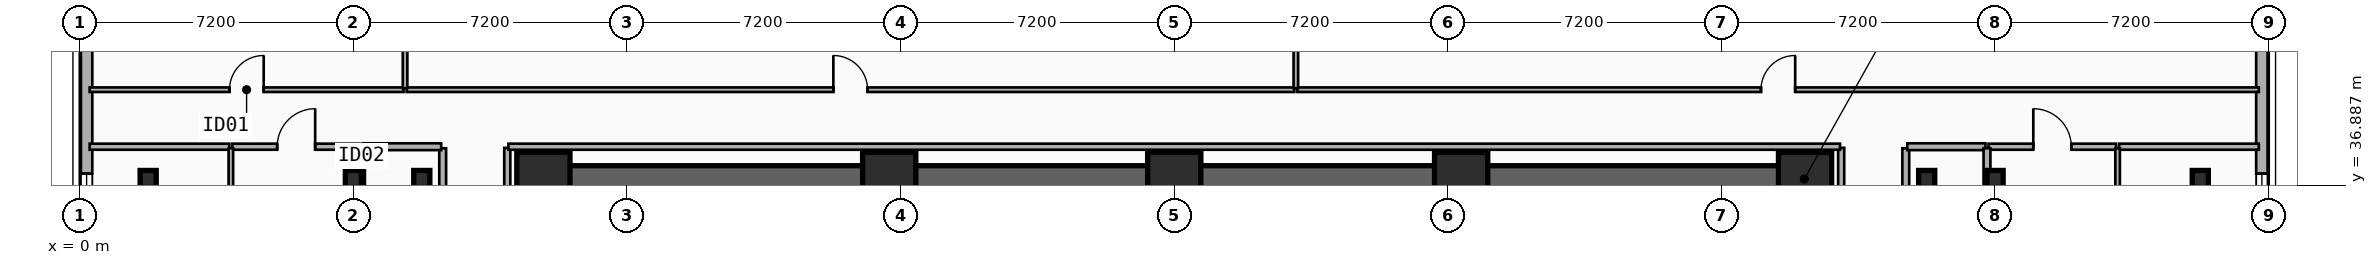
"""IFC4 building model, lengths in metres.
Left out: names, types, materials, properties, quantities, classifications, styles, units other than length and angle.
Written with IfcOpenShell. Run it as: python <this file> out.ifc"""

import sys

from ifc_helpers import new_model, si_unit, direction, frame, frame_2d, origin, origin_2d, place, context, subcontext, project, spatial, rectangle, i_section, extrude, element, fill, save


model = new_model("IFC4")
c1 = context("Model", 3, precision=1e-05, world=origin(), true_north=direction((0.0, 1.0)))
c2 = subcontext(c1, "Body", "Model", "MODEL_VIEW")
j1 = project(units=[si_unit("LENGTHUNIT", "METRE"), si_unit("PLANEANGLEUNIT", "RADIAN")], contexts=[c1])
p1 = place(None, origin())
s1 = spatial("IfcSite", under=j1, at=p1, CompositionType="ELEMENT")
p2 = place(p1, origin())
s2 = spatial("IfcBuilding", under=s1, at=p2, CompositionType="ELEMENT")
p3 = place(p2, frame((0.0, 0.0, 64.0)))
s3 = spatial("IfcBuildingStorey", under=s2, at=p3, CompositionType="ELEMENT", Elevation=64.0)
p4 = place(p3, frame((12.15, 37.05, 0.0), z_axis=(0.0, 0.0, 1.0), x_axis=(1.0, 0.0, 0.0)))
e1 = element("IfcWall", 1, at=p4, inside=s3, PredefinedType="SHEAR", context=c2, shape_type="SweptSolid", body=[
    extrude(rectangle(XDim=33.23, YDim=0.7, at=frame_2d((16.615, 0.0))), origin(), (0.0, 0.0, 1.0), 3.5),
])
for number, where, z_axis, x_axis in (
    (2, (12.2, 37.05, 0.0), (0.0, 0.0, 1.0), (1.0, 0.0, 0.0)),
    (3, (21.3, 37.05, 0.0), (0.0, 0.0, 1.0), (1.0, 0.0, 0.0)),
    (4, (28.8, 37.05, 0.0), (0.0, 0.0, 1.0), (1.0, 0.0, 0.0)),
    (5, (36.35, 37.05, 0.0), (0.0, 0.0, 1.0), (1.0, 0.0, 0.0)),
    (6, (45.4, 37.05, 0.0), (0.0, 0.0, 1.0), (1.0, 0.0, 0.0)),
):
    element("IfcColumn", number, at=place(p3, frame(where, z_axis=z_axis, x_axis=x_axis)), inside=s3, PredefinedType="COLUMN", context=c2, shape_type="SweptSolid", body=[
        extrude(rectangle(XDim=1.4, YDim=1.4, at=origin_2d()), origin(), (0.0, 0.0, 1.0), 3.5),
    ])
for number, where, z_axis, x_axis in (
    (7, (9.0, 37.05, 0.0), (0.0, 0.0, 1.0), (1.0, 0.0, 0.0)),
    (8, (48.6, 37.05, 0.0), (0.0, 0.0, 1.0), (1.0, 0.0, 0.0)),
    (9, (1.8, 37.05, 0.0), (0.0, 0.0, 1.0), (1.0, 0.0, 0.0)),
    (10, (7.2, 37.05, 0.0), (0.0, 0.0, 1.0), (1.0, 0.0, 0.0)),
    (11, (50.4, 37.05, 0.0), (0.0, 0.0, 1.0), (1.0, 0.0, 0.0)),
    (12, (55.8, 37.05, 0.0), (0.0, 0.0, 1.0), (1.0, 0.0, 0.0)),
):
    element("IfcColumn", number, at=place(p3, frame(where, z_axis=z_axis, x_axis=x_axis)), inside=s3, PredefinedType="COLUMN", context=c2, shape_type="SweptSolid", body=[
        extrude(i_section(OverallWidth=0.424, OverallDepth=0.45, WebThickness=0.041, FlangeThickness=0.065, FilletRadius=0.015, at=origin_2d()), origin(), (0.0, 0.0, 1.0), 3.5),
    ])
p5 = place(p3, frame((57.42, 41.0, 0.0), z_axis=(0.0, 0.0, 1.0), x_axis=(0.0, -1.0, 0.0)))
e13 = element("IfcWall", 13, at=p5, inside=s3, PredefinedType="SOLIDWALL", context=c2, shape_type="SweptSolid", body=[
    extrude(rectangle(XDim=15.2, YDim=0.3, at=frame_2d((7.6, 0.0))), origin(), (0.0, 0.0, 1.0), 3.24),
])
p6 = place(p5, frame((8.781, 0.0, 0.48)))
e14 = element("IfcOpeningElement", 14, at=p6, cuts=e13, PredefinedType="OPENING", context=c2, shape_type="SweptSolid", body=[
    extrude(rectangle(XDim=1.4, YDim=1.8, at=frame_2d((0.7, 0.9))), frame((0.0, 0.16, 0.0), z_axis=(0.0, -1.0, 0.0), x_axis=(1.0, 0.0, 0.0)), (0.0, 0.0, 1.0), 0.32),
])
p7 = place(p5, frame((10.94, 0.0, 0.48)))
e15 = element("IfcOpeningElement", 15, at=p7, cuts=e13, PredefinedType="OPENING", context=c2, shape_type="SweptSolid", body=[
    extrude(rectangle(XDim=1.4, YDim=1.8, at=frame_2d((0.7, 0.9))), frame((0.0, 0.16, 0.0), z_axis=(0.0, -1.0, 0.0), x_axis=(1.0, 0.0, 0.0)), (0.0, 0.0, 1.0), 0.32),
])
p8 = place(p5, frame((3.807, 0.0, 0.48)))
e16 = element("IfcOpeningElement", 16, at=p8, cuts=e13, PredefinedType="OPENING", context=c2, shape_type="SweptSolid", body=[
    extrude(rectangle(XDim=1.4, YDim=1.8, at=frame_2d((0.7, 0.9))), frame((0.0, 0.16, 0.0), z_axis=(0.0, -1.0, 0.0), x_axis=(1.0, 0.0, 0.0)), (0.0, 0.0, 1.0), 0.32),
])
p9 = place(p5, frame((5.614, 0.0, 0.48)))
e17 = element("IfcOpeningElement", 17, at=p9, cuts=e13, PredefinedType="OPENING", context=c2, shape_type="SweptSolid", body=[
    extrude(rectangle(XDim=1.4, YDim=1.8, at=frame_2d((0.7, 0.9))), frame((0.0, 0.16, 0.0), z_axis=(0.0, -1.0, 0.0), x_axis=(1.0, 0.0, 0.0)), (0.0, 0.0, 1.0), 0.32),
])
p10 = place(p3, frame((0.18, 25.8, 0.0), z_axis=(0.0, 0.0, 1.0), x_axis=(0.0, 1.0, 0.0)))
e18 = element("IfcWall", 18, at=p10, inside=s3, PredefinedType="SOLIDWALL", context=c2, shape_type="SweptSolid", body=[
    extrude(rectangle(XDim=15.2, YDim=0.3, at=frame_2d((7.6, 0.0))), origin(), (0.0, 0.0, 1.0), 3.24),
])
p11 = place(p10, frame((2.86, 0.0, 0.48)))
e19 = element("IfcOpeningElement", 19, at=p11, cuts=e18, PredefinedType="OPENING", context=c2, shape_type="SweptSolid", body=[
    extrude(rectangle(XDim=1.4, YDim=1.8, at=frame_2d((0.7, 0.9))), frame((0.0, 0.16, 0.0), z_axis=(0.0, -1.0, 0.0), x_axis=(1.0, 0.0, 0.0)), (0.0, 0.0, 1.0), 0.32),
])
p12 = place(p10, frame((5.019, 0.0, 0.48)))
e20 = element("IfcOpeningElement", 20, at=p12, cuts=e18, PredefinedType="OPENING", context=c2, shape_type="SweptSolid", body=[
    extrude(rectangle(XDim=1.4, YDim=1.8, at=frame_2d((0.7, 0.9))), frame((0.0, 0.16, 0.0), z_axis=(0.0, -1.0, 0.0), x_axis=(1.0, 0.0, 0.0)), (0.0, 0.0, 1.0), 0.32),
])
p13 = place(p10, frame((8.186, 0.0, 0.48)))
e21 = element("IfcOpeningElement", 21, at=p13, cuts=e18, PredefinedType="OPENING", context=c2, shape_type="SweptSolid", body=[
    extrude(rectangle(XDim=1.4, YDim=1.8, at=frame_2d((0.7, 0.9))), frame((0.0, 0.16, 0.0), z_axis=(0.0, -1.0, 0.0), x_axis=(1.0, 0.0, 0.0)), (0.0, 0.0, 1.0), 0.32),
])
p14 = place(p10, frame((9.993, 0.0, 0.48)))
e22 = element("IfcOpeningElement", 22, at=p14, cuts=e18, PredefinedType="OPENING", context=c2, shape_type="SweptSolid", body=[
    extrude(rectangle(XDim=1.4, YDim=1.8, at=frame_2d((0.7, 0.9))), frame((0.0, 0.16, 0.0), z_axis=(0.0, -1.0, 0.0), x_axis=(1.0, 0.0, 0.0)), (0.0, 0.0, 1.0), 0.32),
])
for number, where, z_axis, x_axis in (
    (23, (9.55, 34.232, 0.0), (0.0, 0.0, 1.0), (0.0, 1.0, 0.0)),
    (24, (48.05, 34.232, 0.0), (0.0, 0.0, 1.0), (0.0, 1.0, 0.0)),
):
    element("IfcWall", number, at=place(p3, frame(where, z_axis=z_axis, x_axis=x_axis)), inside=s3, PredefinedType="PLUMBINGWALL", context=c2, shape_type="SweptSolid", body=[
        extrude(rectangle(XDim=3.628, YDim=0.18, at=frame_2d((1.814, 0.0))), origin(), (0.0, 0.0, 1.0), 2.72),
    ])
p15 = place(p3, frame((4.016, 37.9, 0.0), z_axis=(0.0, 0.0, 1.0), x_axis=(1.0, 0.0, 0.0)))
e25 = element("IfcWall", 25, at=p15, inside=s3, PredefinedType="PARTITIONING", context=c2, shape_type="SweptSolid", body=[
    extrude(rectangle(XDim=3.357, YDim=0.16, at=frame_2d((1.678, 0.0))), origin(), (0.0, 0.0, 1.0), 3.24),
])
p16 = place(p15, frame((1.178, 0.0, 0.0)))
e26 = element("IfcOpeningElement", 26, at=p16, cuts=e25, PredefinedType="OPENING", context=c2, shape_type="SweptSolid", body=[
    extrude(rectangle(XDim=1.0, YDim=2.15, at=frame_2d((0.5, 1.075))), frame((0.0, 0.09, 0.0), z_axis=(0.0, -1.0, 0.0), x_axis=(1.0, 0.0, 0.0)), (0.0, 0.0, 1.0), 0.18),
])
p17 = place(p3, frame((7.453, 37.9, 0.0), z_axis=(0.0, 0.0, 1.0), x_axis=(1.0, 0.0, 0.0)))
e27 = element("IfcWall", 27, at=p17, inside=s3, PredefinedType="PLUMBINGWALL", context=c2, shape_type="SweptSolid", body=[
    extrude(rectangle(XDim=2.057, YDim=0.18, at=frame_2d((1.029, 0.0))), origin(), (0.0, 0.0, 1.0), 3.24),
])
p18 = place(p3, frame((0.26, 37.9, 0.0), z_axis=(0.0, 0.0, 1.0), x_axis=(1.0, 0.0, 0.0)))
e28 = element("IfcWall", 28, at=p18, inside=s3, PredefinedType="PARTITIONING", context=c2, shape_type="SweptSolid", body=[
    extrude(rectangle(XDim=3.676, YDim=0.16, at=frame_2d((1.838, 0.0))), origin(), (0.0, 0.0, 1.0), 3.24),
])
p19 = place(p3, frame((50.227, 37.9, 0.0), z_axis=(0.0, 0.0, 1.0), x_axis=(1.0, 0.0, 0.0)))
e29 = element("IfcWall", 29, at=p19, inside=s3, PredefinedType="PARTITIONING", context=c2, shape_type="SweptSolid", body=[
    extrude(rectangle(XDim=3.357, YDim=0.16, at=frame_2d((1.678, 0.0))), origin(), (0.0, 0.0, 1.0), 3.24),
])
p20 = place(p19, frame((1.178, 0.0, 0.0)))
e30 = element("IfcOpeningElement", 30, at=p20, cuts=e29, PredefinedType="OPENING", context=c2, shape_type="SweptSolid", body=[
    extrude(rectangle(XDim=1.0, YDim=2.15, at=frame_2d((0.5, 1.075))), frame((0.0, 0.09, 0.0), z_axis=(0.0, -1.0, 0.0), x_axis=(1.0, 0.0, 0.0)), (0.0, 0.0, 1.0), 0.18),
])
p21 = place(p3, frame((48.09, 37.9, 0.0), z_axis=(0.0, 0.0, 1.0), x_axis=(1.0, 0.0, 0.0)))
e31 = element("IfcWall", 31, at=p21, inside=s3, PredefinedType="PLUMBINGWALL", context=c2, shape_type="SweptSolid", body=[
    extrude(rectangle(XDim=2.057, YDim=0.18, at=frame_2d((1.028, 0.0))), origin(), (0.0, 0.0, 1.0), 3.24),
])
p22 = place(p3, frame((53.664, 37.9, 0.0), z_axis=(0.0, 0.0, 1.0), x_axis=(1.0, 0.0, 0.0)))
e32 = element("IfcWall", 32, at=p22, inside=s3, PredefinedType="PARTITIONING", context=c2, shape_type="SweptSolid", body=[
    extrude(rectangle(XDim=3.676, YDim=0.16, at=frame_2d((1.838, 0.0))), origin(), (0.0, 0.0, 1.0), 3.24),
])
p23 = place(p3, frame((0.26, 39.4, 0.0), z_axis=(0.0, 0.0, 1.0), x_axis=(1.0, 0.0, 0.0)))
e33 = element("IfcWall", 33, at=p23, inside=s3, PredefinedType="PARTITIONING", context=c2, shape_type="SweptSolid", body=[
    extrude(rectangle(XDim=8.26, YDim=0.12, at=frame_2d((4.13, 0.0))), origin(), (0.0, 0.0, 1.0), 3.24),
])
p24 = place(p23, frame((3.68, 0.0, 0.0)))
e34 = element("IfcOpeningElement", 34, at=p24, cuts=e33, PredefinedType="OPENING", context=c2, shape_type="SweptSolid", body=[
    extrude(rectangle(XDim=0.9, YDim=2.1, at=frame_2d((0.45, 1.05))), frame((0.0, 0.07, 0.0), z_axis=(0.0, -1.0, 0.0), x_axis=(1.0, 0.0, 0.0)), (0.0, 0.0, 1.0), 0.14),
])
p25 = place(p3, frame((8.6, 39.4, 0.0), z_axis=(0.0, 0.0, 1.0), x_axis=(1.0, 0.0, 0.0)))
e35 = element("IfcWall", 35, at=p25, inside=s3, PredefinedType="PARTITIONING", context=c2, shape_type="SweptSolid", body=[
    extrude(rectangle(XDim=23.36, YDim=0.12, at=frame_2d((11.68, 0.0))), origin(), (0.0, 0.0, 1.0), 3.24),
])
p26 = place(p25, frame((11.23, 0.0, 0.0)))
e36 = element("IfcOpeningElement", 36, at=p26, cuts=e35, PredefinedType="OPENING", context=c2, shape_type="SweptSolid", body=[
    extrude(rectangle(XDim=0.9, YDim=2.1, at=frame_2d((0.45, 1.05))), frame((0.0, 0.07, 0.0), z_axis=(0.0, -1.0, 0.0), x_axis=(1.0, 0.0, 0.0)), (0.0, 0.0, 1.0), 0.14),
])
p27 = place(p3, frame((32.04, 39.4, 0.0), z_axis=(0.0, 0.0, 1.0), x_axis=(1.0, 0.0, 0.0)))
e37 = element("IfcWall", 37, at=p27, inside=s3, PredefinedType="PARTITIONING", context=c2, shape_type="SweptSolid", body=[
    extrude(rectangle(XDim=25.3, YDim=0.12, at=frame_2d((12.65, 0.0))), origin(), (0.0, 0.0, 1.0), 3.24),
])
p28 = place(p27, frame((12.2, 0.0, 0.0)))
e38 = element("IfcOpeningElement", 38, at=p28, cuts=e37, PredefinedType="OPENING", context=c2, shape_type="SweptSolid", body=[
    extrude(rectangle(XDim=0.9, YDim=2.1, at=frame_2d((0.45, 1.05))), frame((0.0, 0.07, 0.0), z_axis=(0.0, -1.0, 0.0), x_axis=(1.0, 0.0, 0.0)), (0.0, 0.0, 1.0), 0.14),
])
p29 = place(p3, frame((7.413, 34.232, 0.0), z_axis=(0.0, 0.0, 1.0), x_axis=(0.0, 1.0, 0.0)))
e39 = element("IfcWall", 39, at=p29, inside=s3, PredefinedType="PLUMBINGWALL", context=c2, shape_type="SweptSolid", body=[
    extrude(rectangle(XDim=3.628, YDim=0.18, at=frame_2d((1.814, 0.0))), origin(), (0.0, 0.0, 1.0), 2.57),
])
p30 = place(p29, frame((1.389, 0.0, 0.0)))
e40 = element("IfcOpeningElement", 40, at=p30, cuts=e39, PredefinedType="OPENING", context=c2, shape_type="SweptSolid", body=[
    extrude(rectangle(XDim=0.85, YDim=2.1, at=frame_2d((0.425, 1.05))), frame((0.0, 0.1, 0.0), z_axis=(0.0, -1.0, 0.0), x_axis=(1.0, 0.0, 0.0)), (0.0, 0.0, 1.0), 0.2),
])
p31 = place(p3, frame((3.976, 33.319, 0.0), z_axis=(0.0, 0.0, 1.0), x_axis=(0.0, 1.0, 0.0)))
e41 = element("IfcWall", 41, at=p31, inside=s3, PredefinedType="PARTITIONING", context=c2, shape_type="SweptSolid", body=[
    extrude(rectangle(XDim=4.541, YDim=0.12, at=frame_2d((2.271, 0.0))), origin(), (0.0, 0.0, 1.0), 2.72),
])
p32 = place(p31, frame((1.821, 0.0, 0.0)))
e42 = element("IfcOpeningElement", 42, at=p32, cuts=e41, PredefinedType="OPENING", context=c2, shape_type="SweptSolid", body=[
    extrude(rectangle(XDim=0.9, YDim=2.1, at=frame_2d((0.45, 1.05))), frame((0.0, 0.07, 0.0), z_axis=(0.0, -1.0, 0.0), x_axis=(1.0, 0.0, 0.0)), (0.0, 0.0, 1.0), 0.14),
])
p33 = place(p3, frame((50.187, 34.232, 0.0), z_axis=(0.0, 0.0, 1.0), x_axis=(0.0, 1.0, 0.0)))
e43 = element("IfcWall", 43, at=p33, inside=s3, PredefinedType="PLUMBINGWALL", context=c2, shape_type="SweptSolid", body=[
    extrude(rectangle(XDim=3.628, YDim=0.18, at=frame_2d((1.814, 0.0))), origin(), (0.0, 0.0, 1.0), 2.57),
])
p34 = place(p33, frame((1.389, 0.0, 0.0)))
e44 = element("IfcOpeningElement", 44, at=p34, cuts=e43, PredefinedType="OPENING", context=c2, shape_type="SweptSolid", body=[
    extrude(rectangle(XDim=0.85, YDim=2.1, at=frame_2d((0.425, 1.05))), frame((0.0, 0.1, 0.0), z_axis=(0.0, -1.0, 0.0), x_axis=(1.0, 0.0, 0.0)), (0.0, 0.0, 1.0), 0.2),
])
p35 = place(p3, frame((53.624, 33.319, 0.0), z_axis=(0.0, 0.0, 1.0), x_axis=(0.0, 1.0, 0.0)))
e45 = element("IfcWall", 45, at=p35, inside=s3, PredefinedType="PARTITIONING", context=c2, shape_type="SweptSolid", body=[
    extrude(rectangle(XDim=4.541, YDim=0.12, at=frame_2d((2.271, 0.0))), origin(), (0.0, 0.0, 1.0), 2.72),
])
p36 = place(p35, frame((1.821, 0.0, 0.0)))
e46 = element("IfcOpeningElement", 46, at=p36, cuts=e45, PredefinedType="OPENING", context=c2, shape_type="SweptSolid", body=[
    extrude(rectangle(XDim=0.9, YDim=2.1, at=frame_2d((0.45, 1.05))), frame((0.0, 0.07, 0.0), z_axis=(0.0, -1.0, 0.0), x_axis=(1.0, 0.0, 0.0)), (0.0, 0.0, 1.0), 0.14),
])
for number, where, z_axis, x_axis in (
    (47, (8.56, 39.44, 0.0), (0.0, 0.0, 1.0), (0.0, 1.0, 0.0)),
    (48, (32.0, 39.44, 0.0), (0.0, 0.0, 1.0), (0.0, 1.0, 0.0)),
):
    element("IfcWall", number, at=place(p3, frame(where, z_axis=z_axis, x_axis=x_axis)), inside=s3, PredefinedType="PARTITIONING", context=c2, shape_type="SweptSolid", body=[
        extrude(rectangle(XDim=5.5, YDim=0.12, at=frame_2d((2.75, 0.0))), origin(), (0.0, 0.0, 1.0), 3.24),
    ])
for number, where, z_axis, x_axis in (
    (49, (11.25, 27.63, 0.0), (0.0, 0.0, 1.0), (0.0, 1.0, 0.0)),
    (50, (46.35, 27.63, 0.0), (0.0, 0.0, 1.0), (0.0, 1.0, 0.0)),
):
    element("IfcWall", number, at=place(p3, frame(where, z_axis=z_axis, x_axis=x_axis)), inside=s3, PredefinedType="PARTITIONING", context=c2, shape_type="SweptSolid", body=[
        extrude(rectangle(XDim=10.24, YDim=0.16, at=frame_2d((5.12, 0.0))), origin(), (0.0, 0.0, 1.0), 2.72),
    ])
p37 = place(p3, frame((11.28, 37.9, 0.0), z_axis=(0.0, 0.0, 1.0), x_axis=(1.0, 0.0, 0.0)))
e51 = element("IfcWall", 51, at=p37, inside=s3, PredefinedType="PARTITIONING", context=c2, shape_type="SweptSolid", body=[
    extrude(rectangle(XDim=35.04, YDim=0.16, at=frame_2d((17.52, 0.0))), origin(), (0.0, 0.0, 1.0), 3.24),
])
p38 = place(p8, origin())
e52 = element("IfcWindow", 52, at=p38, inside=s3, PartitioningType="SINGLE_PANEL", PredefinedType="WINDOW", context=c2, shape_type="SweptSolid", body=[
    extrude(rectangle(XDim=1.4, YDim=1.8, at=frame_2d((0.7, 0.9))), frame((0.0, 0.03, 0.0), z_axis=(0.0, -1.0, 0.0), x_axis=(1.0, 0.0, 0.0)), (0.0, 0.0, 1.0), 0.06),
])
fill(e16, e52)
p39 = place(p14, origin())
e53 = element("IfcWindow", 53, at=p39, inside=s3, PartitioningType="SINGLE_PANEL", PredefinedType="WINDOW", context=c2, shape_type="SweptSolid", body=[
    extrude(rectangle(XDim=1.4, YDim=1.8, at=frame_2d((0.7, 0.9))), frame((0.0, 0.03, 0.0), z_axis=(0.0, -1.0, 0.0), x_axis=(1.0, 0.0, 0.0)), (0.0, 0.0, 1.0), 0.06),
])
fill(e22, e53)
p40 = place(p16, origin())
e54 = element("IfcDoor", 54, at=p40, inside=s3, OperationType="SINGLE_SWING_RIGHT", PredefinedType="DOOR", context=c2, shape_type="SweptSolid", body=[
    extrude(rectangle(XDim=1.0, YDim=2.15, at=frame_2d((0.5, 1.075))), frame((0.0, 0.025, 0.0), z_axis=(0.0, -1.0, 0.0), x_axis=(1.0, 0.0, 0.0)), (0.0, 0.0, 1.0), 0.05),
])
fill(e26, e54)
p41 = place(p20, origin())
e55 = element("IfcDoor", 55, at=p41, inside=s3, OperationType="SINGLE_SWING_LEFT", PredefinedType="DOOR", context=c2, shape_type="SweptSolid", body=[
    extrude(rectangle(XDim=1.0, YDim=2.15, at=frame_2d((0.5, 1.075))), frame((0.0, 0.025, 0.0), z_axis=(0.0, -1.0, 0.0), x_axis=(1.0, 0.0, 0.0)), (0.0, 0.0, 1.0), 0.05),
])
fill(e30, e55)
p42 = place(p24, origin())
e56 = element("IfcDoor", 56, at=p42, inside=s3, OperationType="SINGLE_SWING_RIGHT", PredefinedType="DOOR", context=c2, shape_type="SweptSolid", body=[
    extrude(rectangle(XDim=0.9, YDim=2.1, at=frame_2d((0.45, 1.05))), frame((0.0, 0.025, 0.0), z_axis=(0.0, -1.0, 0.0), x_axis=(1.0, 0.0, 0.0)), (0.0, 0.0, 1.0), 0.05),
])
fill(e34, e56)
p43 = place(p26, origin())
e57 = element("IfcDoor", 57, at=p43, inside=s3, OperationType="SINGLE_SWING_LEFT", PredefinedType="DOOR", context=c2, shape_type="SweptSolid", body=[
    extrude(rectangle(XDim=0.9, YDim=2.1, at=frame_2d((0.45, 1.05))), frame((0.0, 0.025, 0.0), z_axis=(0.0, -1.0, 0.0), x_axis=(1.0, 0.0, 0.0)), (0.0, 0.0, 1.0), 0.05),
])
fill(e36, e57)
p44 = place(p28, origin())
e58 = element("IfcDoor", 58, at=p44, inside=s3, OperationType="SINGLE_SWING_RIGHT", PredefinedType="DOOR", context=c2, shape_type="SweptSolid", body=[
    extrude(rectangle(XDim=0.9, YDim=2.1, at=frame_2d((0.45, 1.05))), frame((0.0, 0.025, 0.0), z_axis=(0.0, -1.0, 0.0), x_axis=(1.0, 0.0, 0.0)), (0.0, 0.0, 1.0), 0.05),
])
fill(e38, e58)
save(model, sys.argv[1])
